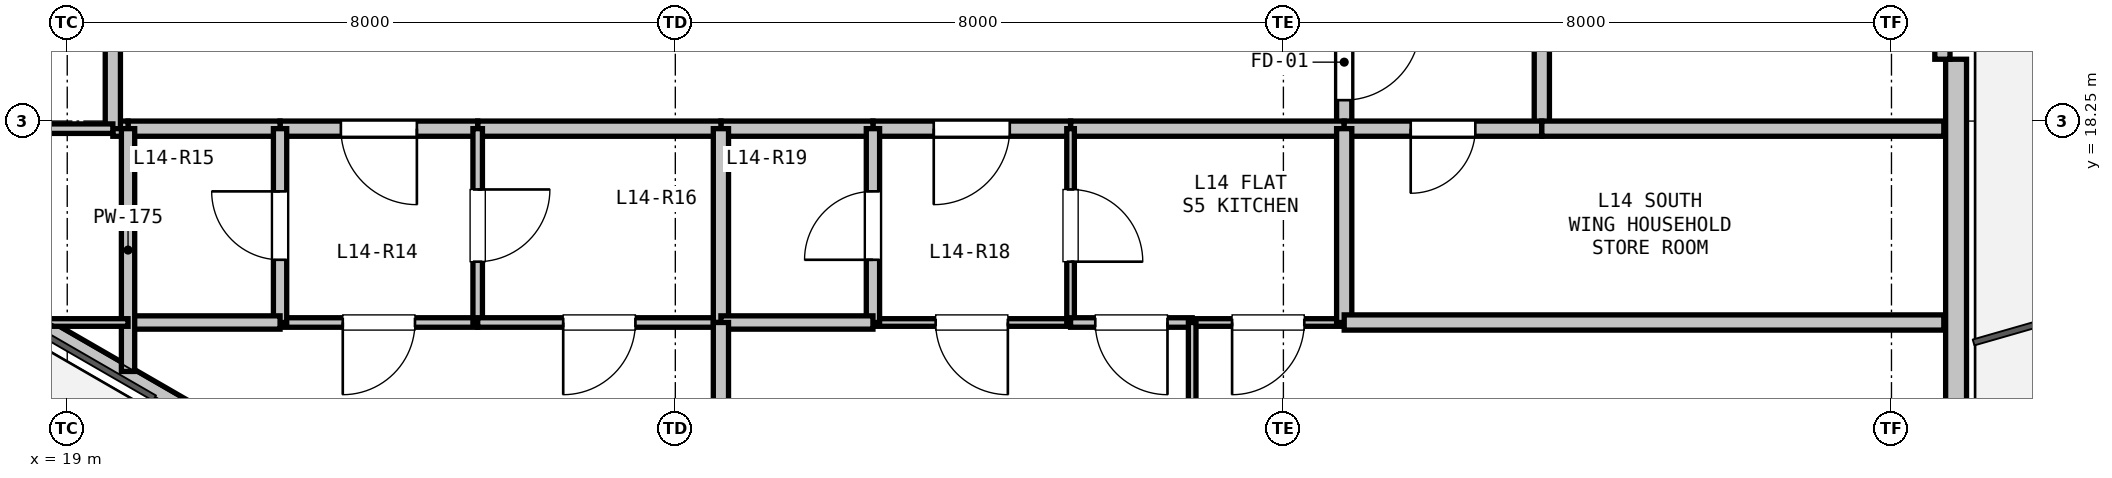
"""IFC4 building model, lengths in metres.
Left out: names, types, materials, properties, quantities, classifications, styles, units other than length and angle.
Written with IfcOpenShell. Run it as: python <this file> out.ifc"""

import sys

from ifc_helpers import new_model, si_unit, direction, frame, frame_2d, origin, place, context, subcontext, project, spatial, rectangle, extrude, element, fill, save


model = new_model("IFC4")
c1 = context("Model", 3, precision=1e-05, world=origin(), true_north=direction((0.0, 1.0)))
c2 = subcontext(c1, "Body", "Model", "MODEL_VIEW")
j1 = project(units=[si_unit("LENGTHUNIT", "METRE"), si_unit("PLANEANGLEUNIT", "RADIAN")], contexts=[c1])
p1 = place(None, origin())
s1 = spatial("IfcSite", under=j1, at=p1, CompositionType="ELEMENT")
p2 = place(p1, origin())
s2 = spatial("IfcBuilding", under=s1, at=p2, CompositionType="ELEMENT")
p3 = place(p2, frame((0.0, 0.0, 52.2)))
s3 = spatial("IfcBuildingStorey", under=s2, at=p3, CompositionType="ELEMENT", Elevation=52.2)
p4 = place(p3, frame((43.85, 19.063, 0.0), z_axis=(0.0, 0.0, 1.0), x_axis=(0.0, -1.0, 0.0)))
e1 = element("IfcWall", 1, at=p4, inside=s3, PredefinedType="SOLIDWALL", context=c2, shape_type="SweptSolid", body=[
    extrude(rectangle(XDim=12.673, YDim=0.275, at=frame_2d((6.336, 0.0))), origin(), (0.0, 0.0, 1.0), 2.66),
])
p5 = place(p3, frame((43.67, 20.763, 0.0), z_axis=(0.0, 0.0, 1.0), x_axis=(0.0, -1.0, 0.0)))
e2 = element("IfcWall", 2, at=p5, inside=s3, PredefinedType="PARAPET", context=c2, shape_type="SweptSolid", body=[
    extrude(rectangle(XDim=1.7, YDim=0.2, at=frame_2d((0.85, 0.0))), origin(), (0.0, 0.0, 1.0), 2.66),
])
p6 = place(p3, frame((26.76, 10.896, 0.0), z_axis=(0.0, 0.0, 1.0), x_axis=(-0.866027351828, 0.499996625875, 0.0)))
e3 = element("IfcWall", 3, at=p6, inside=s3, PredefinedType="PARAPET", context=c2, shape_type="SweptSolid", body=[
    extrude(rectangle(XDim=11.973, YDim=0.2, at=frame_2d((5.987, 0.0))), origin(), (0.0, 0.0, 1.0), 0.2),
])
p7 = place(p3, frame((35.8, 19.9, 0.0), z_axis=(0.0, 0.0, 1.0), x_axis=(0.0, -1.0, 0.0)))
e4 = element("IfcWall", 4, at=p7, inside=s3, PredefinedType="PARTITIONING", context=c2, shape_type="SweptSolid", body=[
    extrude(rectangle(XDim=1.75, YDim=0.2, at=frame_2d((0.875, 0.0))), origin(), (0.0, 0.0, 1.0), 3.04),
])
p8 = place(p7, frame((0.375, 0.0, 0.0)))
e5 = element("IfcOpeningElement", 5, at=p8, cuts=e4, PredefinedType="OPENING", context=c2, shape_type="SweptSolid", body=[
    extrude(rectangle(XDim=1.0, YDim=2.15, at=frame_2d((0.5, 1.075))), frame((0.0, 0.11, 0.0), z_axis=(0.0, -1.0, 0.0), x_axis=(1.0, 0.0, 0.0)), (0.0, 0.0, 1.0), 0.22),
])
p9 = place(p3, frame((35.8, 18.15, 0.0), z_axis=(0.0, 0.0, 1.0), x_axis=(-1.0, 0.0, 0.0)))
e6 = element("IfcWall", 6, at=p9, inside=s3, PredefinedType="PARTITIONING", context=c2, shape_type="SweptSolid", body=[
    extrude(rectangle(XDim=3.6, YDim=0.2, at=frame_2d((1.8, 0.0))), origin(), (0.0, 0.0, 1.0), 3.04),
])
p10 = place(p3, frame((32.2, 18.15, 0.0), z_axis=(0.0, 0.0, 1.0), x_axis=(-1.0, 0.0, 0.0)))
e7 = element("IfcWall", 7, at=p10, inside=s3, PredefinedType="PARTITIONING", context=c2, shape_type="SweptSolid", body=[
    extrude(rectangle(XDim=2.6, YDim=0.2, at=frame_2d((1.3, 0.0))), origin(), (0.0, 0.0, 1.0), 3.04),
])
p11 = place(p10, frame((0.8, 0.0, 0.0)))
e8 = element("IfcOpeningElement", 8, at=p11, cuts=e7, PredefinedType="OPENING", context=c2, shape_type="SweptSolid", body=[
    extrude(rectangle(XDim=1.0, YDim=2.15, at=frame_2d((0.5, 1.075))), frame((0.0, 0.11, 0.0), z_axis=(0.0, -1.0, 0.0), x_axis=(1.0, 0.0, 0.0)), (0.0, 0.0, 1.0), 0.22),
])
p12 = place(p3, frame((29.6, 18.15, 0.0), z_axis=(0.0, 0.0, 1.0), x_axis=(-1.0, 0.0, 0.0)))
e9 = element("IfcWall", 9, at=p12, inside=s3, PredefinedType="PARTITIONING", context=c2, shape_type="SweptSolid", body=[
    extrude(rectangle(XDim=2.0, YDim=0.2, at=frame_2d((1.0, 0.0))), origin(), (0.0, 0.0, 1.0), 3.04),
])
p13 = place(p3, frame((27.6, 18.15, 0.0), z_axis=(0.0, 0.0, 1.0), x_axis=(-1.0, 0.0, 0.0)))
e10 = element("IfcWall", 10, at=p13, inside=s3, PredefinedType="PARTITIONING", context=c2, shape_type="SweptSolid", body=[
    extrude(rectangle(XDim=3.2, YDim=0.2, at=frame_2d((1.6, 0.0))), origin(), (0.0, 0.0, 1.0), 3.04),
])
p14 = place(p3, frame((24.4, 18.15, 0.0), z_axis=(0.0, 0.0, 1.0), x_axis=(-1.0, 0.0, 0.0)))
e11 = element("IfcWall", 11, at=p14, inside=s3, PredefinedType="PARTITIONING", context=c2, shape_type="SweptSolid", body=[
    extrude(rectangle(XDim=2.6, YDim=0.2, at=frame_2d((1.3, 0.0))), origin(), (0.0, 0.0, 1.0), 2.338),
])
p15 = place(p14, frame((0.8, 0.0, 0.0)))
e12 = element("IfcOpeningElement", 12, at=p15, cuts=e11, PredefinedType="OPENING", context=c2, shape_type="SweptSolid", body=[
    extrude(rectangle(XDim=1.0, YDim=2.15, at=frame_2d((0.5, 1.075))), frame((0.0, 0.11, 0.0), z_axis=(0.0, -1.0, 0.0), x_axis=(1.0, 0.0, 0.0)), (0.0, 0.0, 1.0), 0.22),
])
p16 = place(p3, frame((21.8, 18.15, 0.0), z_axis=(0.0, 0.0, 1.0), x_axis=(-1.0, 0.0, 0.0)))
e13 = element("IfcWall", 13, at=p16, inside=s3, PredefinedType="PARTITIONING", context=c2, shape_type="SweptSolid", body=[
    extrude(rectangle(XDim=2.0, YDim=0.2, at=frame_2d((1.0, 0.0))), origin(), (0.0, 0.0, 1.0), 3.04),
])
p17 = place(p3, frame((19.8, 18.15, 0.0), z_axis=(0.0, 0.0, 1.0), x_axis=(-1.0, 0.0, 0.0)))
e14 = element("IfcWall", 14, at=p17, inside=s3, PredefinedType="PARTITIONING", context=c2, shape_type="SweptSolid", body=[
    extrude(rectangle(XDim=0.2, YDim=0.2, at=frame_2d((0.1, 0.0))), origin(), (0.0, 0.0, 1.0), 3.04),
])
p18 = place(p3, frame((19.6, 18.15, 0.0), z_axis=(0.0, 0.0, 1.0), x_axis=(0.0, 1.0, 0.0)))
e15 = element("IfcWall", 15, at=p18, inside=s3, PredefinedType="PARTITIONING", context=c2, shape_type="SweptSolid", body=[
    extrude(rectangle(XDim=3.55, YDim=0.2, at=frame_2d((1.775, 0.0))), origin(), (0.0, 0.0, 1.0), 2.338),
])
p19 = place(p3, frame((38.4, 21.8, 0.0), z_axis=(0.0, 0.0, 1.0), x_axis=(0.0, -1.0, 0.0)))
e16 = element("IfcWall", 16, at=p19, inside=s3, PredefinedType="PARTITIONING", context=c2, shape_type="SweptSolid", body=[
    extrude(rectangle(XDim=3.65, YDim=0.2, at=frame_2d((1.825, 0.0))), origin(), (0.0, 0.0, 1.0), 3.04),
])
p20 = place(p19, frame((1.325, 0.0, 0.0)))
e17 = element("IfcOpeningElement", 17, at=p20, cuts=e16, PredefinedType="OPENING", context=c2, shape_type="SweptSolid", body=[
    extrude(rectangle(XDim=1.0, YDim=2.15, at=frame_2d((0.5, 1.075))), frame((0.0, 0.11, 0.0), z_axis=(0.0, -1.0, 0.0), x_axis=(1.0, 0.0, 0.0)), (0.0, 0.0, 1.0), 0.22),
])
p21 = place(p3, frame((38.4, 18.15, 0.0), z_axis=(0.0, 0.0, 1.0), x_axis=(-1.0, 0.0, 0.0)))
e18 = element("IfcWall", 18, at=p21, inside=s3, PredefinedType="PARTITIONING", context=c2, shape_type="SweptSolid", body=[
    extrude(rectangle(XDim=2.6, YDim=0.2, at=frame_2d((1.3, 0.0))), origin(), (0.0, 0.0, 1.0), 2.338),
])
p22 = place(p21, frame((0.875, 0.0, 0.0)))
e19 = element("IfcOpeningElement", 19, at=p22, cuts=e18, PredefinedType="OPENING", context=c2, shape_type="SweptSolid", body=[
    extrude(rectangle(XDim=0.85, YDim=2.1, at=frame_2d((0.425, 1.05))), frame((0.0, 0.11, 0.0), z_axis=(0.0, -1.0, 0.0), x_axis=(1.0, 0.0, 0.0)), (0.0, 0.0, 1.0), 0.22),
])
p23 = place(p3, frame((24.4, 15.6, 0.0), z_axis=(0.0, 0.0, 1.0), x_axis=(-1.0, 0.0, 0.0)))
e20 = element("IfcWall", 20, at=p23, inside=s3, PredefinedType="PARTITIONING", context=c2, shape_type="SweptSolid", body=[
    extrude(rectangle(XDim=2.6, YDim=0.125, at=frame_2d((1.3, 0.0))), origin(), (0.0, 0.0, 1.0), 3.04),
])
p24 = place(p23, frame((0.825, 0.0, 0.0)))
e21 = element("IfcOpeningElement", 21, at=p24, cuts=e20, PredefinedType="OPENING", context=c2, shape_type="SweptSolid", body=[
    extrude(rectangle(XDim=0.95, YDim=2.1, at=frame_2d((0.475, 1.05))), frame((0.0, 0.073, 0.0), z_axis=(0.0, -1.0, 0.0), x_axis=(1.0, 0.0, 0.0)), (0.0, 0.0, 1.0), 0.145),
])
p25 = place(p3, frame((21.8, 15.6, 0.0), z_axis=(0.0, 0.0, 1.0), x_axis=(0.0, 1.0, 0.0)))
e22 = element("IfcWall", 22, at=p25, inside=s3, PredefinedType="PLUMBINGWALL", context=c2, shape_type="SweptSolid", body=[
    extrude(rectangle(XDim=2.55, YDim=0.175, at=frame_2d((1.275, 0.0))), origin(), (0.0, 0.0, 1.0), 3.04),
])
p26 = place(p25, frame((0.825, 0.0, 0.0)))
e23 = element("IfcOpeningElement", 23, at=p26, cuts=e22, PredefinedType="OPENING", context=c2, shape_type="SweptSolid", body=[
    extrude(rectangle(XDim=0.9, YDim=2.1, at=frame_2d((0.45, 1.05))), frame((0.0, 0.097, 0.0), z_axis=(0.0, -1.0, 0.0), x_axis=(1.0, 0.0, 0.0)), (0.0, 0.0, 1.0), 0.195),
])
p27 = place(p3, frame((24.4, 18.15, 0.0), z_axis=(0.0, 0.0, 1.0), x_axis=(0.0, -1.0, 0.0)))
e24 = element("IfcWall", 24, at=p27, inside=s3, PredefinedType="PARTITIONING", context=c2, shape_type="SweptSolid", body=[
    extrude(rectangle(XDim=2.55, YDim=0.125, at=frame_2d((1.275, 0.0))), origin(), (0.0, 0.0, 1.0), 2.338),
])
p28 = place(p27, frame((0.8, 0.0, 0.0)))
e25 = element("IfcOpeningElement", 25, at=p28, cuts=e24, PredefinedType="OPENING", context=c2, shape_type="SweptSolid", body=[
    extrude(rectangle(XDim=0.95, YDim=2.1, at=frame_2d((0.475, 1.05))), frame((0.0, 0.073, 0.0), z_axis=(0.0, -1.0, 0.0), x_axis=(1.0, 0.0, 0.0)), (0.0, 0.0, 1.0), 0.145),
])
p29 = place(p3, frame((32.2, 15.6, 0.0), z_axis=(0.0, 0.0, 1.0), x_axis=(-1.0, 0.0, 0.0)))
e26 = element("IfcWall", 26, at=p29, inside=s3, PredefinedType="PARTITIONING", context=c2, shape_type="SweptSolid", body=[
    extrude(rectangle(XDim=2.6, YDim=0.1, at=frame_2d((1.3, 0.0))), origin(), (0.0, 0.0, 1.0), 3.04),
])
p30 = place(p29, frame((0.825, 0.0, 0.0)))
e27 = element("IfcOpeningElement", 27, at=p30, cuts=e26, PredefinedType="OPENING", context=c2, shape_type="SweptSolid", body=[
    extrude(rectangle(XDim=0.95, YDim=2.1, at=frame_2d((0.475, 1.05))), frame((0.0, 0.06, 0.0), z_axis=(0.0, -1.0, 0.0), x_axis=(1.0, 0.0, 0.0)), (0.0, 0.0, 1.0), 0.12),
])
p31 = place(p3, frame((29.6, 15.6, 0.0), z_axis=(0.0, 0.0, 1.0), x_axis=(0.0, 1.0, 0.0)))
e28 = element("IfcWall", 28, at=p31, inside=s3, PredefinedType="PLUMBINGWALL", context=c2, shape_type="SweptSolid", body=[
    extrude(rectangle(XDim=2.55, YDim=0.175, at=frame_2d((1.275, 0.0))), origin(), (0.0, 0.0, 1.0), 3.04),
])
p32 = place(p31, frame((0.825, 0.0, 0.0)))
e29 = element("IfcOpeningElement", 29, at=p32, cuts=e28, PredefinedType="OPENING", context=c2, shape_type="SweptSolid", body=[
    extrude(rectangle(XDim=0.9, YDim=2.1, at=frame_2d((0.45, 1.05))), frame((0.0, 0.097, 0.0), z_axis=(0.0, -1.0, 0.0), x_axis=(1.0, 0.0, 0.0)), (0.0, 0.0, 1.0), 0.195),
])
p33 = place(p3, frame((32.2, 18.15, 0.0), z_axis=(0.0, 0.0, 1.0), x_axis=(0.0, -1.0, 0.0)))
e30 = element("IfcWall", 30, at=p33, inside=s3, PredefinedType="PARTITIONING", context=c2, shape_type="SweptSolid", body=[
    extrude(rectangle(XDim=2.55, YDim=0.1, at=frame_2d((1.275, 0.0))), origin(), (0.0, 0.0, 1.0), 3.04),
])
p34 = place(p33, frame((0.8, 0.0, 0.0)))
e31 = element("IfcOpeningElement", 31, at=p34, cuts=e30, PredefinedType="OPENING", context=c2, shape_type="SweptSolid", body=[
    extrude(rectangle(XDim=0.95, YDim=2.1, at=frame_2d((0.475, 1.05))), frame((0.0, 0.06, 0.0), z_axis=(0.0, -1.0, 0.0), x_axis=(1.0, 0.0, 0.0)), (0.0, 0.0, 1.0), 0.12),
])
p35 = place(p3, frame((21.8, 15.6, 0.0), z_axis=(0.0, 0.0, 1.0), x_axis=(-1.0, 0.0, 0.0)))
e32 = element("IfcWall", 32, at=p35, inside=s3, PredefinedType="PLUMBINGWALL", context=c2, shape_type="SweptSolid", body=[
    extrude(rectangle(XDim=2.0, YDim=0.175, at=frame_2d((1.0, 0.0))), origin(), (0.0, 0.0, 1.0), 2.365),
])
p36 = place(p3, frame((19.8, 14.956, 0.0), z_axis=(0.0, 0.0, 1.0), x_axis=(0.0, 1.0, 0.0)))
e33 = element("IfcWall", 33, at=p36, inside=s3, PredefinedType="PLUMBINGWALL", context=c2, shape_type="SweptSolid", body=[
    extrude(rectangle(XDim=3.194, YDim=0.175, at=frame_2d((1.597, 0.0))), origin(), (0.0, 0.0, 1.0), 2.365),
])
p37 = place(p3, frame((27.6, 15.6, 0.0), z_axis=(0.0, 0.0, 1.0), x_axis=(-1.0, 0.0, 0.0)))
e34 = element("IfcWall", 34, at=p37, inside=s3, PredefinedType="PARTITIONING", context=c2, shape_type="SweptSolid", body=[
    extrude(rectangle(XDim=3.2, YDim=0.125, at=frame_2d((1.6, 0.0))), origin(), (0.0, 0.0, 1.0), 2.338),
])
p38 = place(p37, frame((1.125, 0.0, 0.0)))
e35 = element("IfcOpeningElement", 35, at=p38, cuts=e34, PredefinedType="OPENING", context=c2, shape_type="SweptSolid", body=[
    extrude(rectangle(XDim=0.95, YDim=2.1, at=frame_2d((0.475, 1.05))), frame((0.0, 0.073, 0.0), z_axis=(0.0, -1.0, 0.0), x_axis=(1.0, 0.0, 0.0)), (0.0, 0.0, 1.0), 0.145),
])
p39 = place(p3, frame((27.6, 18.15, 0.0), z_axis=(0.0, 0.0, 1.0), x_axis=(0.0, -1.0, 0.0)))
e36 = element("IfcWall", 36, at=p39, inside=s3, PredefinedType="PARTITIONING", context=c2, shape_type="SweptSolid", body=[
    extrude(rectangle(XDim=2.55, YDim=0.2, at=frame_2d((1.275, 0.0))), origin(), (0.0, 0.0, 1.0), 3.04),
])
p40 = place(p3, frame((29.6, 15.6, 0.0), z_axis=(0.0, 0.0, 1.0), x_axis=(-1.0, 0.0, 0.0)))
e37 = element("IfcWall", 37, at=p40, inside=s3, PredefinedType="PLUMBINGWALL", context=c2, shape_type="SweptSolid", body=[
    extrude(rectangle(XDim=2.0, YDim=0.175, at=frame_2d((1.0, 0.0))), origin(), (0.0, 0.0, 1.0), 3.04),
])
p41 = place(p3, frame((35.8, 15.6, 0.0), z_axis=(0.0, 0.0, 1.0), x_axis=(-1.0, 0.0, 0.0)))
e38 = element("IfcWall", 38, at=p41, inside=s3, PredefinedType="PARTITIONING", context=c2, shape_type="SweptSolid", body=[
    extrude(rectangle(XDim=2.0, YDim=0.1, at=frame_2d((1.0, 0.0))), origin(), (0.0, 0.0, 1.0), 3.04),
])
p42 = place(p41, frame((0.525, 0.0, 0.0)))
e39 = element("IfcOpeningElement", 39, at=p42, cuts=e38, PredefinedType="OPENING", context=c2, shape_type="SweptSolid", body=[
    extrude(rectangle(XDim=0.95, YDim=2.1, at=frame_2d((0.475, 1.05))), frame((0.0, 0.06, 0.0), z_axis=(0.0, -1.0, 0.0), x_axis=(1.0, 0.0, 0.0)), (0.0, 0.0, 1.0), 0.12),
])
p43 = place(p3, frame((33.8, 15.6, 0.0), z_axis=(0.0, 0.0, 1.0), x_axis=(-1.0, 0.0, 0.0)))
e40 = element("IfcWall", 40, at=p43, inside=s3, PredefinedType="PARTITIONING", context=c2, shape_type="SweptSolid", body=[
    extrude(rectangle(XDim=1.6, YDim=0.125, at=frame_2d((0.8, 0.0))), origin(), (0.0, 0.0, 1.0), 3.04),
])
p44 = place(p43, frame((0.325, 0.0, 0.0)))
e41 = element("IfcOpeningElement", 41, at=p44, cuts=e40, PredefinedType="OPENING", context=c2, shape_type="SweptSolid", body=[
    extrude(rectangle(XDim=0.95, YDim=2.1, at=frame_2d((0.475, 1.05))), frame((0.0, 0.073, 0.0), z_axis=(0.0, -1.0, 0.0), x_axis=(1.0, 0.0, 0.0)), (0.0, 0.0, 1.0), 0.145),
])
p45 = place(p3, frame((35.8, 18.15, 0.0), z_axis=(0.0, 0.0, 1.0), x_axis=(0.0, -1.0, 0.0)))
e42 = element("IfcWall", 42, at=p45, inside=s3, PredefinedType="PARTITIONING", context=c2, shape_type="SweptSolid", body=[
    extrude(rectangle(XDim=2.55, YDim=0.2, at=frame_2d((1.275, 0.0))), origin(), (0.0, 0.0, 1.0), 3.04),
])
p46 = place(p3, frame((19.6, 18.15, 0.0), z_axis=(0.0, 0.0, 1.0), x_axis=(-1.0, 0.0, 0.0)))
e43 = element("IfcWall", 43, at=p46, inside=s3, PredefinedType="PARTITIONING", context=c2, shape_type="SweptSolid", body=[
    extrude(rectangle(XDim=2.45, YDim=0.125, at=frame_2d((1.225, 0.0))), origin(), (0.0, 0.0, 1.0), 3.04),
])
p47 = place(p3, frame((38.4, 18.15, 0.0), z_axis=(0.0, 0.0, 1.0), x_axis=(1.0, 0.0, 0.0)))
e44 = element("IfcWall", 44, at=p47, inside=s3, PredefinedType="PARTITIONING", context=c2, shape_type="SweptSolid", body=[
    extrude(rectangle(XDim=5.289, YDim=0.2, at=frame_2d((2.644, 0.0))), origin(), (0.0, 0.0, 1.0), 2.365),
])
p48 = place(p3, frame((43.688, 15.6, 0.0), z_axis=(0.0, 0.0, 1.0), x_axis=(-1.0, 0.0, 0.0)))
e45 = element("IfcWall", 45, at=p48, inside=s3, PredefinedType="PARTITIONING", context=c2, shape_type="SweptSolid", body=[
    extrude(rectangle(XDim=7.888, YDim=0.2, at=frame_2d((3.944, 0.0))), origin(), (0.0, 0.0, 1.0), 2.338),
])
p49 = place(p3, frame((18.678, 15.6, 0.0), z_axis=(0.0, 0.0, 1.0), x_axis=(1.0, 0.0, 0.0)))
e46 = element("IfcWall", 46, at=p49, inside=s3, PredefinedType="PARTITIONING", context=c2, shape_type="SweptSolid", body=[
    extrude(rectangle(XDim=1.122, YDim=0.1, at=frame_2d((0.561, 0.0))), origin(), (0.0, 0.0, 1.0), 2.365),
])
p50 = place(p3, frame((27.6, 15.6, 0.0), z_axis=(0.0, 0.0, 1.0), x_axis=(0.0, -1.0, 0.0)))
e47 = element("IfcWall", 47, at=p50, inside=s3, PredefinedType="PARTITIONING", context=c2, shape_type="SweptSolid", body=[
    extrude(rectangle(XDim=4.838, YDim=0.2, at=frame_2d((2.419, 0.0))), origin(), (0.0, 0.0, 1.0), 2.338),
])
p51 = place(p3, frame((33.8, 15.6, 0.0), z_axis=(0.0, 0.0, 1.0), x_axis=(0.0, -1.0, 0.0)))
e48 = element("IfcWall", 48, at=p51, inside=s3, PredefinedType="PARTITIONING", context=c2, shape_type="SweptSolid", body=[
    extrude(rectangle(XDim=5.98, YDim=0.1, at=frame_2d((2.99, 0.0))), origin(), (0.0, 0.0, 1.0), 3.04),
])
p52 = place(p51, frame((2.515, 0.0, 0.0)))
e49 = element("IfcOpeningElement", 49, at=p52, cuts=e48, PredefinedType="OPENING", context=c2, shape_type="SweptSolid", body=[
    extrude(rectangle(XDim=0.95, YDim=2.1, at=frame_2d((0.475, 1.05))), frame((0.0, 0.06, 0.0), z_axis=(0.0, -1.0, 0.0), x_axis=(1.0, 0.0, 0.0)), (0.0, 0.0, 1.0), 0.12),
])
p53 = place(p8, origin())
e50 = element("IfcDoor", 50, at=p53, inside=s3, OperationType="SINGLE_SWING_LEFT", PredefinedType="DOOR", context=c2, shape_type="SweptSolid", body=[
    extrude(rectangle(XDim=1.0, YDim=2.15, at=frame_2d((0.5, 1.075))), frame((0.0, 0.025, 0.0), z_axis=(0.0, -1.0, 0.0), x_axis=(1.0, 0.0, 0.0)), (0.0, 0.0, 1.0), 0.05),
])
fill(e5, e50)
p54 = place(p15, origin())
e51 = element("IfcDoor", 51, at=p54, inside=s3, OperationType="SINGLE_SWING_LEFT", PredefinedType="DOOR", context=c2, shape_type="SweptSolid", body=[
    extrude(rectangle(XDim=1.0, YDim=2.15, at=frame_2d((0.5, 1.075))), frame((0.0, 0.025, 0.0), z_axis=(0.0, -1.0, 0.0), x_axis=(1.0, 0.0, 0.0)), (0.0, 0.0, 1.0), 0.05),
])
fill(e12, e51)
p55 = place(p11, origin())
e52 = element("IfcDoor", 52, at=p55, inside=s3, OperationType="SINGLE_SWING_RIGHT", PredefinedType="DOOR", context=c2, shape_type="SweptSolid", body=[
    extrude(rectangle(XDim=1.0, YDim=2.15, at=frame_2d((0.5, 1.075))), frame((0.0, 0.025, 0.0), z_axis=(0.0, -1.0, 0.0), x_axis=(1.0, 0.0, 0.0)), (0.0, 0.0, 1.0), 0.05),
])
fill(e8, e52)
p56 = place(p22, origin())
e53 = element("IfcDoor", 53, at=p56, inside=s3, OperationType="SINGLE_SWING_RIGHT", PredefinedType="DOOR", context=c2, shape_type="SweptSolid", body=[
    extrude(rectangle(XDim=0.85, YDim=2.1, at=frame_2d((0.425, 1.05))), frame((0.0, 0.025, 0.0), z_axis=(0.0, -1.0, 0.0), x_axis=(1.0, 0.0, 0.0)), (0.0, 0.0, 1.0), 0.05),
])
fill(e19, e53)
p57 = place(p26, origin())
e54 = element("IfcDoor", 54, at=p57, inside=s3, OperationType="SINGLE_SWING_RIGHT", PredefinedType="DOOR", context=c2, shape_type="SweptSolid", body=[
    extrude(rectangle(XDim=0.9, YDim=2.1, at=frame_2d((0.45, 1.05))), frame((0.0, 0.025, 0.0), z_axis=(0.0, -1.0, 0.0), x_axis=(1.0, 0.0, 0.0)), (0.0, 0.0, 1.0), 0.05),
])
fill(e23, e54)
p58 = place(p28, origin())
e55 = element("IfcDoor", 55, at=p58, inside=s3, OperationType="SINGLE_SWING_LEFT", PredefinedType="DOOR", context=c2, shape_type="SweptSolid", body=[
    extrude(rectangle(XDim=0.95, YDim=2.1, at=frame_2d((0.475, 1.05))), frame((0.0, 0.025, 0.0), z_axis=(0.0, -1.0, 0.0), x_axis=(1.0, 0.0, 0.0)), (0.0, 0.0, 1.0), 0.05),
])
fill(e25, e55)
p59 = place(p24, origin())
e56 = element("IfcDoor", 56, at=p59, inside=s3, OperationType="SINGLE_SWING_RIGHT", PredefinedType="DOOR", context=c2, shape_type="SweptSolid", body=[
    extrude(rectangle(XDim=0.95, YDim=2.1, at=frame_2d((0.475, 1.05))), frame((0.0, 0.025, 0.0), z_axis=(0.0, -1.0, 0.0), x_axis=(1.0, 0.0, 0.0)), (0.0, 0.0, 1.0), 0.05),
])
fill(e21, e56)
p60 = place(p32, origin())
e57 = element("IfcDoor", 57, at=p60, inside=s3, OperationType="SINGLE_SWING_LEFT", PredefinedType="DOOR", context=c2, shape_type="SweptSolid", body=[
    extrude(rectangle(XDim=0.9, YDim=2.1, at=frame_2d((0.45, 1.05))), frame((0.0, 0.025, 0.0), z_axis=(0.0, -1.0, 0.0), x_axis=(1.0, 0.0, 0.0)), (0.0, 0.0, 1.0), 0.05),
])
fill(e29, e57)
p61 = place(p34, origin())
e58 = element("IfcDoor", 58, at=p61, inside=s3, OperationType="SINGLE_SWING_RIGHT", PredefinedType="DOOR", context=c2, shape_type="SweptSolid", body=[
    extrude(rectangle(XDim=0.95, YDim=2.1, at=frame_2d((0.475, 1.05))), frame((0.0, 0.025, 0.0), z_axis=(0.0, -1.0, 0.0), x_axis=(1.0, 0.0, 0.0)), (0.0, 0.0, 1.0), 0.05),
])
fill(e31, e58)
p62 = place(p30, origin())
e59 = element("IfcDoor", 59, at=p62, inside=s3, OperationType="SINGLE_SWING_LEFT", PredefinedType="DOOR", context=c2, shape_type="SweptSolid", body=[
    extrude(rectangle(XDim=0.95, YDim=2.1, at=frame_2d((0.475, 1.05))), frame((0.0, 0.025, 0.0), z_axis=(0.0, -1.0, 0.0), x_axis=(1.0, 0.0, 0.0)), (0.0, 0.0, 1.0), 0.05),
])
fill(e27, e59)
p63 = place(p38, origin())
e60 = element("IfcDoor", 60, at=p63, inside=s3, OperationType="SINGLE_SWING_RIGHT", PredefinedType="DOOR", context=c2, shape_type="SweptSolid", body=[
    extrude(rectangle(XDim=0.95, YDim=2.1, at=frame_2d((0.475, 1.05))), frame((0.0, 0.025, 0.0), z_axis=(0.0, -1.0, 0.0), x_axis=(1.0, 0.0, 0.0)), (0.0, 0.0, 1.0), 0.05),
])
fill(e35, e60)
p64 = place(p44, origin())
e61 = element("IfcDoor", 61, at=p64, inside=s3, OperationType="SINGLE_SWING_LEFT", PredefinedType="DOOR", context=c2, shape_type="SweptSolid", body=[
    extrude(rectangle(XDim=0.95, YDim=2.1, at=frame_2d((0.475, 1.05))), frame((0.0, 0.025, 0.0), z_axis=(0.0, -1.0, 0.0), x_axis=(1.0, 0.0, 0.0)), (0.0, 0.0, 1.0), 0.05),
])
fill(e41, e61)
p65 = place(p42, origin())
e62 = element("IfcDoor", 62, at=p65, inside=s3, OperationType="SINGLE_SWING_RIGHT", PredefinedType="DOOR", context=c2, shape_type="SweptSolid", body=[
    extrude(rectangle(XDim=0.95, YDim=2.1, at=frame_2d((0.475, 1.05))), frame((0.0, 0.025, 0.0), z_axis=(0.0, -1.0, 0.0), x_axis=(1.0, 0.0, 0.0)), (0.0, 0.0, 1.0), 0.05),
])
fill(e39, e62)
save(model, sys.argv[1])
